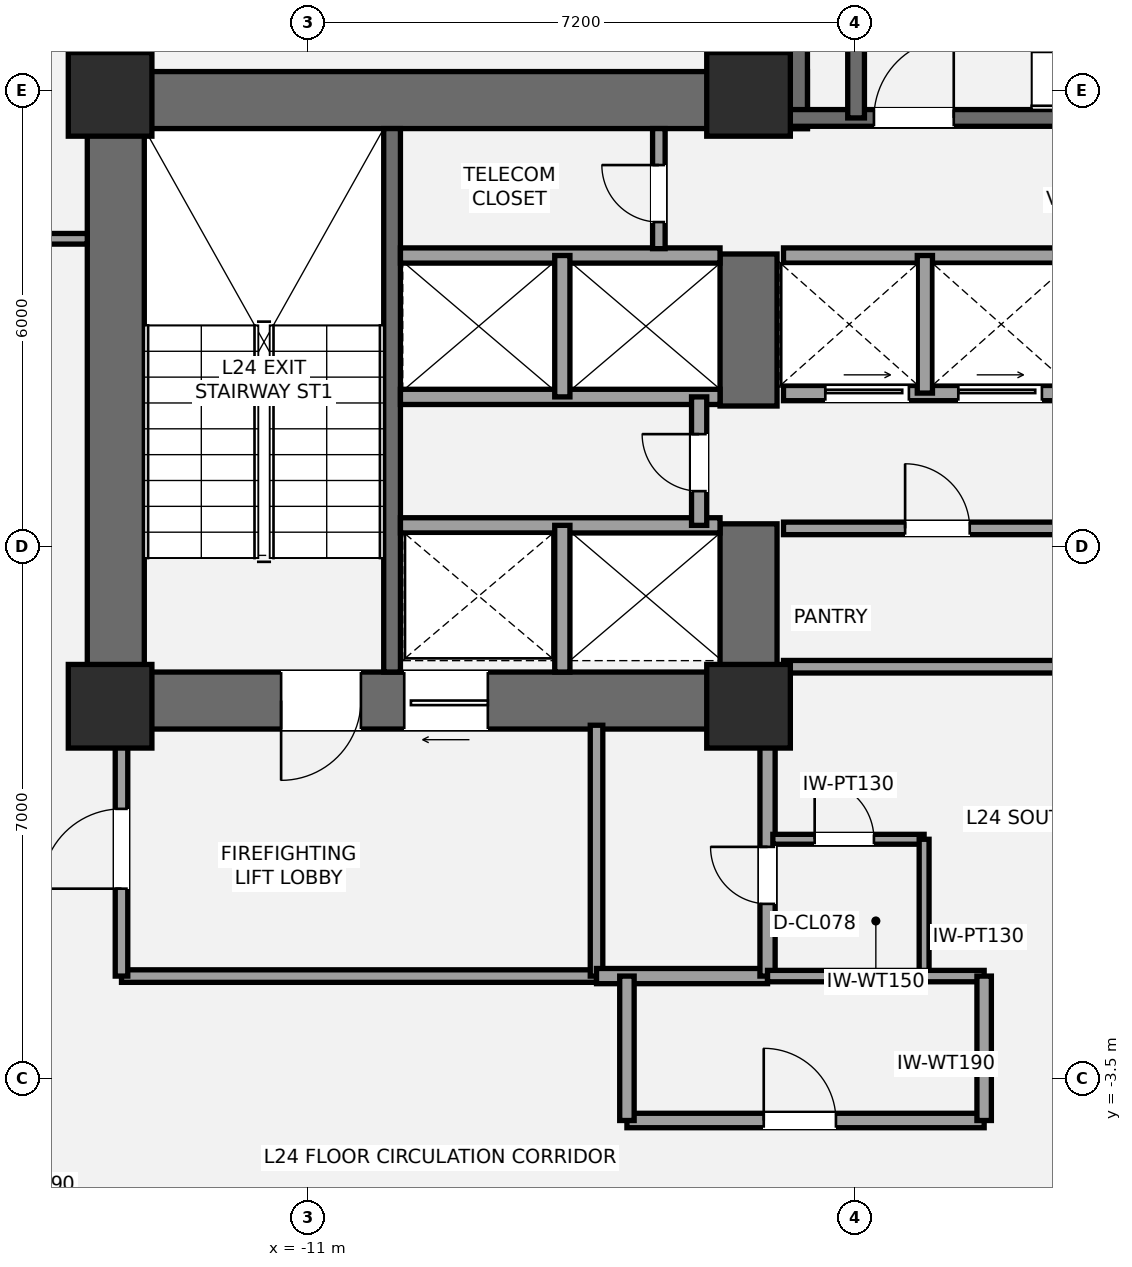
"""IFC4 building model, lengths in metres.
Left out: names, types, materials, properties, quantities, classifications, styles, units other than length and angle.
Written with IfcOpenShell. Run it as: python <this file> out.ifc"""

import sys

from ifc_helpers import new_model, si_unit, direction, frame, frame_2d, origin, origin_2d, place, context, subcontext, project, spatial, rectangle, extrude, element, fill, save


model = new_model("IFC4")
c1 = context("Model", 3, precision=1e-05, world=origin(), true_north=direction((0.0, 1.0)))
c2 = subcontext(c1, "Body", "Model", "MODEL_VIEW")
j1 = project(units=[si_unit("LENGTHUNIT", "METRE"), si_unit("PLANEANGLEUNIT", "RADIAN")], contexts=[c1])
p1 = place(None, origin())
s1 = spatial("IfcSite", under=j1, at=p1, CompositionType="ELEMENT")
p2 = place(p1, origin())
s2 = spatial("IfcBuilding", under=s1, at=p2, CompositionType="ELEMENT")
p3 = place(p2, frame((0.0, 0.0, 93.1)))
s3 = spatial("IfcBuildingStorey", under=s2, at=p3, CompositionType="ELEMENT", Elevation=93.1)
p4 = place(p3, frame((-13.525, 1.1, 0.0), z_axis=(0.0, 0.0, 1.0), x_axis=(0.0, 1.0, 0.0)))
e1 = element("IfcWall", 1, at=p4, inside=s3, PredefinedType="SHEAR", context=c2, shape_type="SweptSolid", body=[
    extrude(rectangle(XDim=8.65, YDim=0.75, at=frame_2d((4.325, 0.0))), origin(), (0.0, 0.0, 1.0), 3.5),
])
p5 = place(p3, frame((-13.9, 9.375, 0.0), z_axis=(0.0, 0.0, 1.0), x_axis=(1.0, 0.0, 0.0)))
e2 = element("IfcWall", 2, at=p5, inside=s3, PredefinedType="SHEAR", context=c2, shape_type="SweptSolid", body=[
    extrude(rectangle(XDim=9.475, YDim=0.75, at=frame_2d((4.737, 0.0))), origin(), (0.0, 0.0, 1.0), 3.5),
])
p6 = place(p3, frame((-4.825, 1.475, 0.0), z_axis=(0.0, 0.0, 1.0), x_axis=(-1.0, 0.0, 0.0)))
e3 = element("IfcWall", 3, at=p6, inside=s3, PredefinedType="SHEAR", context=c2, shape_type="SweptSolid", body=[
    extrude(rectangle(XDim=9.075, YDim=0.75, at=frame_2d((4.538, 0.0))), origin(), (0.0, 0.0, 1.0), 3.5),
])
p7 = place(p6, frame((5.475, 0.0, 0.0)))
e4 = element("IfcOpeningElement", 4, at=p7, cuts=e3, PredefinedType="OPENING", context=c2, shape_type="SweptSolid", body=[
    extrude(rectangle(XDim=1.05, YDim=2.15, at=frame_2d((0.525, 1.075))), frame((0.0, 0.385, 0.0), z_axis=(0.0, -1.0, 0.0), x_axis=(1.0, 0.0, 0.0)), (0.0, 0.0, 1.0), 0.77),
])
p8 = place(p6, frame((3.805, 0.0, 0.0)))
e5 = element("IfcOpeningElement", 5, at=p8, cuts=e3, PredefinedType="OPENING", context=c2, shape_type="SweptSolid", body=[
    extrude(rectangle(XDim=1.1, YDim=2.2, at=frame_2d((0.55, 1.1))), frame((0.0, 0.385, 0.0), z_axis=(0.0, -1.0, 0.0), x_axis=(1.0, 0.0, 0.0)), (0.0, 0.0, 1.0), 0.77),
])
p9 = place(p3, frame((-5.2, 1.1, 0.0), z_axis=(0.0, 0.0, 1.0), x_axis=(0.0, 1.0, 0.0)))
e6 = element("IfcWall", 6, at=p9, inside=s3, PredefinedType="SHEAR", context=c2, shape_type="SweptSolid", body=[
    extrude(rectangle(XDim=2.7, YDim=0.75, at=frame_2d((1.35, 0.0))), origin(), (0.0, 0.0, 1.0), 3.5),
])
p10 = place(p3, frame((-5.2, 5.35, 0.0), z_axis=(0.0, 0.0, 1.0), x_axis=(0.0, 1.0, 0.0)))
e7 = element("IfcWall", 7, at=p10, inside=s3, PredefinedType="SHEAR", context=c2, shape_type="SweptSolid", body=[
    extrude(rectangle(XDim=2.0, YDim=0.75, at=frame_2d((1.0, 0.0))), origin(), (0.0, 0.0, 1.0), 3.5),
])
p11 = place(p3, frame((-9.89, 1.85, 0.0), z_axis=(0.0, 0.0, 1.0), x_axis=(0.0, 1.0, 0.0)))
e8 = element("IfcWall", 8, at=p11, inside=s3, PredefinedType="SHEAR", context=c2, shape_type="SweptSolid", body=[
    extrude(rectangle(XDim=7.15, YDim=0.22, at=frame_2d((3.575, 0.0))), origin(), (0.0, 0.0, 1.0), 3.5),
])
p12 = place(p3, frame((-4.8, 9.0, 0.0), z_axis=(0.0, 0.0, 1.0), x_axis=(0.0, 1.0, 0.0)))
e9 = element("IfcWall", 9, at=p12, inside=s3, PredefinedType="SHEAR", context=c2, shape_type="SweptSolid", body=[
    extrude(rectangle(XDim=4.15, YDim=0.75, at=frame_2d((2.075, 0.0))), origin(), (0.0, 0.0, 1.0), 3.5),
])
p13 = place(p3, frame((-4.7, 9.14, 0.0), z_axis=(0.0, 0.0, 1.0), x_axis=(1.0, 0.0, 0.0)))
e10 = element("IfcWall", 10, at=p13, inside=s3, PredefinedType="SHEAR", context=c2, shape_type="SweptSolid", body=[
    extrude(rectangle(XDim=9.3, YDim=0.22, at=frame_2d((4.65, 0.0))), origin(), (0.0, 0.0, 1.0), 3.5),
])
p14 = place(p13, frame((1.15, 0.0, 0.0)))
e11 = element("IfcOpeningElement", 11, at=p14, cuts=e10, PredefinedType="OPENING", context=c2, shape_type="SweptSolid", body=[
    extrude(rectangle(XDim=1.05, YDim=2.15, at=frame_2d((0.525, 1.075))), frame((0.0, 0.12, 0.0), z_axis=(0.0, -1.0, 0.0), x_axis=(1.0, 0.0, 0.0)), (0.0, 0.0, 1.0), 0.24),
])
p15 = place(p3, frame((-3.785, 9.14, 0.0), z_axis=(0.0, 0.0, 1.0), x_axis=(0.0, 1.0, 0.0)))
e12 = element("IfcWall", 12, at=p15, inside=s3, PredefinedType="SHEAR", context=c2, shape_type="SweptSolid", body=[
    extrude(rectangle(XDim=3.26, YDim=0.22, at=frame_2d((1.63, 0.0))), origin(), (0.0, 0.0, 1.0), 3.5),
])
for number, where, z_axis, x_axis in (
    (13, (-13.6, 1.4, 0.0), (0.0, 0.0, 1.0), (1.0, 0.0, 0.0)),
    (14, (-13.6, 9.45, 0.0), (0.0, 0.0, 1.0), (1.0, 0.0, 0.0)),
    (15, (-5.2, 1.4, 0.0), (0.0, 0.0, 1.0), (1.0, 0.0, 0.0)),
    (16, (-5.2, 9.45, 0.0), (0.0, 0.0, 1.0), (1.0, 0.0, 0.0)),
):
    element("IfcColumn", number, at=place(p3, frame(where, z_axis=z_axis, x_axis=x_axis)), inside=s3, PredefinedType="COLUMN", context=c2, shape_type="SweptSolid", body=[
        extrude(rectangle(XDim=1.1, YDim=1.1, at=origin_2d()), origin(), (0.0, 0.0, 1.0), 3.5),
    ])
p16 = place(p3, frame((-13.45, -2.15, 0.0), z_axis=(0.0, 0.0, 1.0), x_axis=(1.0, 0.0, 0.0)))
e17 = element("IfcWall", 17, at=p16, inside=s3, PredefinedType="PARTITIONING", context=c2, shape_type="SweptSolid", body=[
    extrude(rectangle(XDim=6.25, YDim=0.165, at=frame_2d((3.125, 0.0))), origin(), (0.0, 0.0, 1.0), 3.31),
])
p17 = place(p3, frame((-13.45, -2.15, 0.0), z_axis=(0.0, 0.0, 1.0), x_axis=(0.0, 1.0, 0.0)))
e18 = element("IfcWall", 18, at=p17, inside=s3, PredefinedType="PARTITIONING", context=c2, shape_type="SweptSolid", body=[
    extrude(rectangle(XDim=3.3, YDim=0.165, at=frame_2d((1.65, 0.0))), origin(), (0.0, 0.0, 1.0), 2.763),
])
p18 = place(p17, frame((1.15, 0.0, 0.0)))
e19 = element("IfcOpeningElement", 19, at=p18, cuts=e18, PredefinedType="OPENING", context=c2, shape_type="SweptSolid", body=[
    extrude(rectangle(XDim=1.05, YDim=2.15, at=frame_2d((0.525, 1.075))), frame((0.0, 0.093, 0.0), z_axis=(0.0, -1.0, 0.0), x_axis=(1.0, 0.0, 0.0)), (0.0, 0.0, 1.0), 0.185),
])
p19 = place(p3, frame((-7.2, -2.15, 0.0), z_axis=(0.0, 0.0, 1.0), x_axis=(0.0, 1.0, 0.0)))
e20 = element("IfcWall", 20, at=p19, inside=s3, PredefinedType="PARTITIONING", context=c2, shape_type="SweptSolid", body=[
    extrude(rectangle(XDim=3.3, YDim=0.165, at=frame_2d((1.65, 0.0))), origin(), (0.0, 0.0, 1.0), 2.763),
])
p20 = place(p3, frame((-7.2, -2.15, 0.0), z_axis=(0.0, 0.0, 1.0), x_axis=(1.0, 0.0, 0.0)))
e21 = element("IfcWall", 21, at=p20, inside=s3, PredefinedType="SOLIDWALL", context=c2, shape_type="SweptSolid", body=[
    extrude(rectangle(XDim=2.25, YDim=0.2, at=frame_2d((1.125, 0.0))), origin(), (0.0, 0.0, 1.0), 3.31),
])
p21 = place(p3, frame((-4.95, -2.15, 0.0), z_axis=(0.0, 0.0, 1.0), x_axis=(0.0, 1.0, 0.0)))
e22 = element("IfcWall", 22, at=p21, inside=s3, PredefinedType="SOLIDWALL", context=c2, shape_type="SweptSolid", body=[
    extrude(rectangle(XDim=3.3, YDim=0.2, at=frame_2d((1.65, 0.0))), origin(), (0.0, 0.0, 1.0), 2.763),
])
p22 = place(p21, frame((0.95, 0.0, 0.0)))
e23 = element("IfcOpeningElement", 23, at=p22, cuts=e22, PredefinedType="OPENING", context=c2, shape_type="SweptSolid", body=[
    extrude(rectangle(XDim=0.75, YDim=2.1, at=frame_2d((0.375, 1.05))), frame((0.0, 0.11, 0.0), z_axis=(0.0, -1.0, 0.0), x_axis=(1.0, 0.0, 0.0)), (0.0, 0.0, 1.0), 0.22),
])
p23 = place(p3, frame((-4.88, -0.35, 0.0), z_axis=(0.0, 0.0, 1.0), x_axis=(1.0, 0.0, 0.0)))
e24 = element("IfcWall", 24, at=p23, inside=s3, PredefinedType="PARTITIONING", context=c2, shape_type="SweptSolid", body=[
    extrude(rectangle(XDim=1.99, YDim=0.13, at=frame_2d((0.995, 0.0))), origin(), (0.0, 0.0, 1.0), 3.31),
])
p24 = place(p23, frame((0.55, 0.0, 0.0)))
e25 = element("IfcOpeningElement", 25, at=p24, cuts=e24, PredefinedType="OPENING", context=c2, shape_type="SweptSolid", body=[
    extrude(rectangle(XDim=0.78, YDim=2.1, at=frame_2d((0.39, 1.05))), frame((0.0, 0.075, 0.0), z_axis=(0.0, -1.0, 0.0), x_axis=(1.0, 0.0, 0.0)), (0.0, 0.0, 1.0), 0.15),
])
p25 = place(p3, frame((-2.89, -2.15, 0.0), z_axis=(0.0, 0.0, 1.0), x_axis=(0.0, 1.0, 0.0)))
e26 = element("IfcWall", 26, at=p25, inside=s3, PredefinedType="PARTITIONING", context=c2, shape_type="SweptSolid", body=[
    extrude(rectangle(XDim=1.8, YDim=0.13, at=frame_2d((0.9, 0.0))), origin(), (0.0, 0.0, 1.0), 3.31),
])
p26 = place(p3, frame((-9.78, 3.78, 0.0), z_axis=(0.0, 0.0, 1.0), x_axis=(1.0, 0.0, 0.0)))
e27 = element("IfcWall", 27, at=p26, inside=s3, PredefinedType="SOLIDWALL", context=c2, shape_type="SweptSolid", body=[
    extrude(rectangle(XDim=4.205, YDim=0.2, at=frame_2d((2.103, 0.0))), origin(), (0.0, 0.0, 1.0), 3.31),
])
p27 = place(p3, frame((-7.65, 1.85, 0.0), z_axis=(0.0, 0.0, 1.0), x_axis=(0.0, 1.0, 0.0)))
e28 = element("IfcWall", 28, at=p27, inside=s3, PredefinedType="SOLIDWALL", context=c2, shape_type="SweptSolid", body=[
    extrude(rectangle(XDim=1.93, YDim=0.2, at=frame_2d((0.965, 0.0))), origin(), (0.0, 0.0, 1.0), 3.31),
])
for number, where, z_axis, x_axis in (
    (29, (-9.78, 5.47, 0.0), (0.0, 0.0, 1.0), (1.0, 0.0, 0.0)),
    (30, (-9.78, 7.33, 0.0), (0.0, 0.0, 1.0), (1.0, 0.0, 0.0)),
):
    element("IfcWall", number, at=place(p3, frame(where, z_axis=z_axis, x_axis=x_axis)), inside=s3, PredefinedType="SOLIDWALL", context=c2, shape_type="SweptSolid", body=[
        extrude(rectangle(XDim=4.205, YDim=0.2, at=frame_2d((2.103, 0.0))), origin(), (0.0, 0.0, 1.0), 3.31),
    ])
p28 = place(p3, frame((-7.65, 5.47, 0.0), z_axis=(0.0, 0.0, 1.0), x_axis=(0.0, 1.0, 0.0)))
e31 = element("IfcWall", 31, at=p28, inside=s3, PredefinedType="SOLIDWALL", context=c2, shape_type="SweptSolid", body=[
    extrude(rectangle(XDim=1.86, YDim=0.2, at=frame_2d((0.93, 0.0))), origin(), (0.0, 0.0, 1.0), 3.31),
])
p29 = place(p3, frame((-5.85, 3.78, 0.0), z_axis=(0.0, 0.0, 1.0), x_axis=(0.0, 1.0, 0.0)))
e32 = element("IfcWall", 32, at=p29, inside=s3, PredefinedType="SOLIDWALL", context=c2, shape_type="SweptSolid", body=[
    extrude(rectangle(XDim=1.69, YDim=0.2, at=frame_2d((0.845, 0.0))), origin(), (0.0, 0.0, 1.0), 3.31),
])
p30 = place(p29, frame((0.45, 0.0, 0.0)))
e33 = element("IfcOpeningElement", 33, at=p30, cuts=e32, PredefinedType="OPENING", context=c2, shape_type="SweptSolid", body=[
    extrude(rectangle(XDim=0.75, YDim=2.1, at=frame_2d((0.375, 1.05))), frame((0.0, 0.11, 0.0), z_axis=(0.0, -1.0, 0.0), x_axis=(1.0, 0.0, 0.0)), (0.0, 0.0, 1.0), 0.22),
])
p31 = place(p3, frame((-4.74, 1.92, 0.0), z_axis=(0.0, 0.0, 1.0), x_axis=(1.0, 0.0, 0.0)))
e34 = element("IfcWall", 34, at=p31, inside=s3, PredefinedType="PARTITIONING", context=c2, shape_type="SweptSolid", body=[
    extrude(rectangle(XDim=3.89, YDim=0.165, at=frame_2d((1.945, 0.0))), origin(), (0.0, 0.0, 1.0), 2.3),
])
p32 = place(p3, frame((-4.74, 3.74, 0.0), z_axis=(0.0, 0.0, 1.0), x_axis=(1.0, 0.0, 0.0)))
e35 = element("IfcWall", 35, at=p32, inside=s3, PredefinedType="PARTITIONING", context=c2, shape_type="SweptSolid", body=[
    extrude(rectangle(XDim=3.89, YDim=0.165, at=frame_2d((1.945, 0.0))), origin(), (0.0, 0.0, 1.0), 3.31),
])
p33 = place(p32, frame((1.6, 0.0, 0.0)))
e36 = element("IfcOpeningElement", 36, at=p33, cuts=e35, PredefinedType="OPENING", context=c2, shape_type="SweptSolid", body=[
    extrude(rectangle(XDim=0.85, YDim=2.1, at=frame_2d((0.425, 1.05))), frame((0.0, 0.093, 0.0), z_axis=(0.0, -1.0, 0.0), x_axis=(1.0, 0.0, 0.0)), (0.0, 0.0, 1.0), 0.185),
])
p34 = place(p3, frame((-4.74, 5.52, 0.0), z_axis=(0.0, 0.0, 1.0), x_axis=(1.0, 0.0, 0.0)))
e37 = element("IfcWall", 37, at=p34, inside=s3, PredefinedType="SOLIDWALL", context=c2, shape_type="SweptSolid", body=[
    extrude(rectangle(XDim=3.86, YDim=0.2, at=frame_2d((1.93, 0.0))), origin(), (0.0, 0.0, 1.0), 3.31),
])
p35 = place(p34, frame((0.55, 0.0, 0.0)))
e38 = element("IfcOpeningElement", 38, at=p35, cuts=e37, PredefinedType="OPENING", context=c2, shape_type="SweptSolid", body=[
    extrude(rectangle(XDim=1.1, YDim=2.2, at=frame_2d((0.55, 1.1))), frame((0.0, 0.11, 0.0), z_axis=(0.0, -1.0, 0.0), x_axis=(1.0, 0.0, 0.0)), (0.0, 0.0, 1.0), 0.22),
])
p36 = place(p34, frame((2.3, 0.0, 0.0)))
e39 = element("IfcOpeningElement", 39, at=p36, cuts=e37, PredefinedType="OPENING", context=c2, shape_type="SweptSolid", body=[
    extrude(rectangle(XDim=1.1, YDim=2.2, at=frame_2d((0.55, 1.1))), frame((0.0, 0.11, 0.0), z_axis=(0.0, -1.0, 0.0), x_axis=(1.0, 0.0, 0.0)), (0.0, 0.0, 1.0), 0.22),
])
p37 = place(p3, frame((-4.74, 7.33, 0.0), z_axis=(0.0, 0.0, 1.0), x_axis=(1.0, 0.0, 0.0)))
e40 = element("IfcWall", 40, at=p37, inside=s3, PredefinedType="SOLIDWALL", context=c2, shape_type="SweptSolid", body=[
    extrude(rectangle(XDim=3.86, YDim=0.2, at=frame_2d((1.93, 0.0))), origin(), (0.0, 0.0, 1.0), 3.31),
])
p38 = place(p3, frame((-2.88, 5.52, 0.0), z_axis=(0.0, 0.0, 1.0), x_axis=(0.0, 1.0, 0.0)))
e41 = element("IfcWall", 41, at=p38, inside=s3, PredefinedType="SOLIDWALL", context=c2, shape_type="SweptSolid", body=[
    extrude(rectangle(XDim=1.81, YDim=0.2, at=frame_2d((0.905, 0.0))), origin(), (0.0, 0.0, 1.0), 3.31),
])
p39 = place(p3, frame((-6.38, 7.42, 0.0), z_axis=(0.0, 0.0, 1.0), x_axis=(0.0, 1.0, 0.0)))
e42 = element("IfcWall", 42, at=p39, inside=s3, PredefinedType="PARTITIONING", context=c2, shape_type="SweptSolid", body=[
    extrude(rectangle(XDim=1.58, YDim=0.165, at=frame_2d((0.79, 0.0))), origin(), (0.0, 0.0, 1.0), 3.31),
])
p40 = place(p39, frame((0.35, 0.0, 0.0)))
e43 = element("IfcOpeningElement", 43, at=p40, cuts=e42, PredefinedType="OPENING", context=c2, shape_type="SweptSolid", body=[
    extrude(rectangle(XDim=0.75, YDim=2.1, at=frame_2d((0.375, 1.05))), frame((0.0, 0.093, 0.0), z_axis=(0.0, -1.0, 0.0), x_axis=(1.0, 0.0, 0.0)), (0.0, 0.0, 1.0), 0.185),
])
p41 = place(p3, frame((-6.8, -4.05, 0.0), z_axis=(0.0, 0.0, 1.0), x_axis=(1.0, 0.0, 0.0)))
e44 = element("IfcWall", 44, at=p41, inside=s3, PredefinedType="PLUMBINGWALL", context=c2, shape_type="SweptSolid", body=[
    extrude(rectangle(XDim=4.7, YDim=0.19, at=frame_2d((2.35, 0.0))), origin(), (0.0, 0.0, 1.0), 2.763),
])
p42 = place(p41, frame((1.8, 0.0, 0.0)))
e45 = element("IfcOpeningElement", 45, at=p42, cuts=e44, PredefinedType="OPENING", context=c2, shape_type="SweptSolid", body=[
    extrude(rectangle(XDim=0.95, YDim=2.15, at=frame_2d((0.475, 1.075))), frame((0.0, 0.105, 0.0), z_axis=(0.0, -1.0, 0.0), x_axis=(1.0, 0.0, 0.0)), (0.0, 0.0, 1.0), 0.21),
])
p43 = place(p3, frame((-4.95, -2.15, 0.0), z_axis=(0.0, 0.0, 1.0), x_axis=(1.0, 0.0, 0.0)))
e46 = element("IfcWall", 46, at=p43, inside=s3, PredefinedType="PLUMBINGWALL", context=c2, shape_type="SweptSolid", body=[
    extrude(rectangle(XDim=2.85, YDim=0.15, at=frame_2d((1.425, 0.0))), origin(), (0.0, 0.0, 1.0), 2.763),
])
p44 = place(p3, frame((-6.8, -4.05, 0.0), z_axis=(0.0, 0.0, 1.0), x_axis=(0.0, 1.0, 0.0)))
e47 = element("IfcWall", 47, at=p44, inside=s3, PredefinedType="PLUMBINGWALL", context=c2, shape_type="SweptSolid", body=[
    extrude(rectangle(XDim=1.9, YDim=0.19, at=frame_2d((0.95, 0.0))), origin(), (0.0, 0.0, 1.0), 2.763),
])
p45 = place(p3, frame((-2.1, -4.05, 0.0), z_axis=(0.0, 0.0, 1.0), x_axis=(0.0, 1.0, 0.0)))
e48 = element("IfcWall", 48, at=p45, inside=s3, PredefinedType="PLUMBINGWALL", context=c2, shape_type="SweptSolid", body=[
    extrude(rectangle(XDim=1.9, YDim=0.19, at=frame_2d((0.95, 0.0))), origin(), (0.0, 0.0, 1.0), 3.31),
])
p46 = place(p3, frame((-15.7, 7.55, 0.0), z_axis=(0.0, 0.0, 1.0), x_axis=(1.0, 0.0, 0.0)))
e49 = element("IfcWall", 49, at=p46, inside=s3, PredefinedType="PARTITIONING", context=c2, shape_type="SweptSolid", body=[
    extrude(rectangle(XDim=1.8, YDim=0.14, at=frame_2d((0.9, 0.0))), origin(), (0.0, 0.0, 1.0), 2.763),
])
p47 = place(p46, frame((0.32, 0.0, 0.0)))
e50 = element("IfcOpeningElement", 50, at=p47, cuts=e49, PredefinedType="OPENING", context=c2, shape_type="SweptSolid", body=[
    extrude(rectangle(XDim=0.92, YDim=2.15, at=frame_2d((0.46, 1.075))), frame((0.0, 0.08, 0.0), z_axis=(0.0, -1.0, 0.0), x_axis=(1.0, 0.0, 0.0)), (0.0, 0.0, 1.0), 0.16),
])
p48 = place(p7, origin())
e51 = element("IfcDoor", 51, at=p48, inside=s3, OperationType="SINGLE_SWING_RIGHT", PredefinedType="DOOR", context=c2, shape_type="SweptSolid", body=[
    extrude(rectangle(XDim=1.05, YDim=2.15, at=frame_2d((0.525, 1.075))), frame((0.0, 0.025, 0.0), z_axis=(0.0, -1.0, 0.0), x_axis=(1.0, 0.0, 0.0)), (0.0, 0.0, 1.0), 0.05),
])
fill(e4, e51)
p49 = place(p14, origin())
e52 = element("IfcDoor", 52, at=p49, inside=s3, OperationType="SINGLE_SWING_RIGHT", PredefinedType="DOOR", context=c2, shape_type="SweptSolid", body=[
    extrude(rectangle(XDim=1.05, YDim=2.15, at=frame_2d((0.525, 1.075))), frame((0.0, 0.025, 0.0), z_axis=(0.0, -1.0, 0.0), x_axis=(1.0, 0.0, 0.0)), (0.0, 0.0, 1.0), 0.05),
])
fill(e11, e52)
p50 = place(p18, origin())
e53 = element("IfcDoor", 53, at=p50, inside=s3, OperationType="SINGLE_SWING_LEFT", PredefinedType="DOOR", context=c2, shape_type="SweptSolid", body=[
    extrude(rectangle(XDim=1.05, YDim=2.15, at=frame_2d((0.525, 1.075))), frame((0.0, 0.025, 0.0), z_axis=(0.0, -1.0, 0.0), x_axis=(1.0, 0.0, 0.0)), (0.0, 0.0, 1.0), 0.05),
])
fill(e19, e53)
p51 = place(p22, origin())
e54 = element("IfcDoor", 54, at=p51, inside=s3, OperationType="SINGLE_SWING_RIGHT", PredefinedType="DOOR", context=c2, shape_type="SweptSolid", body=[
    extrude(rectangle(XDim=0.75, YDim=2.1, at=frame_2d((0.375, 1.05))), frame((0.0, 0.025, 0.0), z_axis=(0.0, -1.0, 0.0), x_axis=(1.0, 0.0, 0.0)), (0.0, 0.0, 1.0), 0.05),
])
fill(e23, e54)
p52 = place(p24, origin())
e55 = element("IfcDoor", 55, at=p52, inside=s3, OperationType="SINGLE_SWING_LEFT", PredefinedType="DOOR", context=c2, shape_type="SweptSolid", body=[
    extrude(rectangle(XDim=0.78, YDim=2.1, at=frame_2d((0.39, 1.05))), frame((0.0, 0.025, 0.0), z_axis=(0.0, -1.0, 0.0), x_axis=(1.0, 0.0, 0.0)), (0.0, 0.0, 1.0), 0.05),
])
fill(e25, e55)
p53 = place(p8, origin())
e56 = element("IfcDoor", 56, at=p53, inside=s3, OperationType="SLIDING_TO_LEFT", PredefinedType="DOOR", context=c2, shape_type="SweptSolid", body=[
    extrude(rectangle(XDim=1.1, YDim=2.2, at=frame_2d((0.55, 1.1))), frame((0.0, 0.025, 0.0), z_axis=(0.0, -1.0, 0.0), x_axis=(1.0, 0.0, 0.0)), (0.0, 0.0, 1.0), 0.05),
])
fill(e5, e56)
p54 = place(p30, origin())
e57 = element("IfcDoor", 57, at=p54, inside=s3, OperationType="SINGLE_SWING_RIGHT", PredefinedType="DOOR", context=c2, shape_type="SweptSolid", body=[
    extrude(rectangle(XDim=0.75, YDim=2.1, at=frame_2d((0.375, 1.05))), frame((0.0, 0.025, 0.0), z_axis=(0.0, -1.0, 0.0), x_axis=(1.0, 0.0, 0.0)), (0.0, 0.0, 1.0), 0.05),
])
fill(e33, e57)
p55 = place(p33, origin())
e58 = element("IfcDoor", 58, at=p55, inside=s3, OperationType="SINGLE_SWING_LEFT", PredefinedType="DOOR", context=c2, shape_type="SweptSolid", body=[
    extrude(rectangle(XDim=0.85, YDim=2.1, at=frame_2d((0.425, 1.05))), frame((0.0, 0.025, 0.0), z_axis=(0.0, -1.0, 0.0), x_axis=(1.0, 0.0, 0.0)), (0.0, 0.0, 1.0), 0.05),
])
fill(e36, e58)
p56 = place(p35, origin())
e59 = element("IfcDoor", 59, at=p56, inside=s3, OperationType="SLIDING_TO_LEFT", PredefinedType="DOOR", context=c2, shape_type="SweptSolid", body=[
    extrude(rectangle(XDim=1.1, YDim=2.2, at=frame_2d((0.55, 1.1))), frame((0.0, 0.025, 0.0), z_axis=(0.0, -1.0, 0.0), x_axis=(1.0, 0.0, 0.0)), (0.0, 0.0, 1.0), 0.05),
])
fill(e38, e59)
p57 = place(p36, origin())
e60 = element("IfcDoor", 60, at=p57, inside=s3, OperationType="SLIDING_TO_LEFT", PredefinedType="DOOR", context=c2, shape_type="SweptSolid", body=[
    extrude(rectangle(XDim=1.1, YDim=2.2, at=frame_2d((0.55, 1.1))), frame((0.0, 0.025, 0.0), z_axis=(0.0, -1.0, 0.0), x_axis=(1.0, 0.0, 0.0)), (0.0, 0.0, 1.0), 0.05),
])
fill(e39, e60)
p58 = place(p40, origin())
e61 = element("IfcDoor", 61, at=p58, inside=s3, OperationType="SINGLE_SWING_RIGHT", PredefinedType="DOOR", context=c2, shape_type="SweptSolid", body=[
    extrude(rectangle(XDim=0.75, YDim=2.1, at=frame_2d((0.375, 1.05))), frame((0.0, 0.025, 0.0), z_axis=(0.0, -1.0, 0.0), x_axis=(1.0, 0.0, 0.0)), (0.0, 0.0, 1.0), 0.05),
])
fill(e43, e61)
p59 = place(p42, origin())
e62 = element("IfcDoor", 62, at=p59, inside=s3, OperationType="SINGLE_SWING_LEFT", PredefinedType="DOOR", context=c2, shape_type="SweptSolid", body=[
    extrude(rectangle(XDim=0.95, YDim=2.15, at=frame_2d((0.475, 1.075))), frame((0.0, 0.025, 0.0), z_axis=(0.0, -1.0, 0.0), x_axis=(1.0, 0.0, 0.0)), (0.0, 0.0, 1.0), 0.05),
])
fill(e45, e62)
save(model, sys.argv[1])
